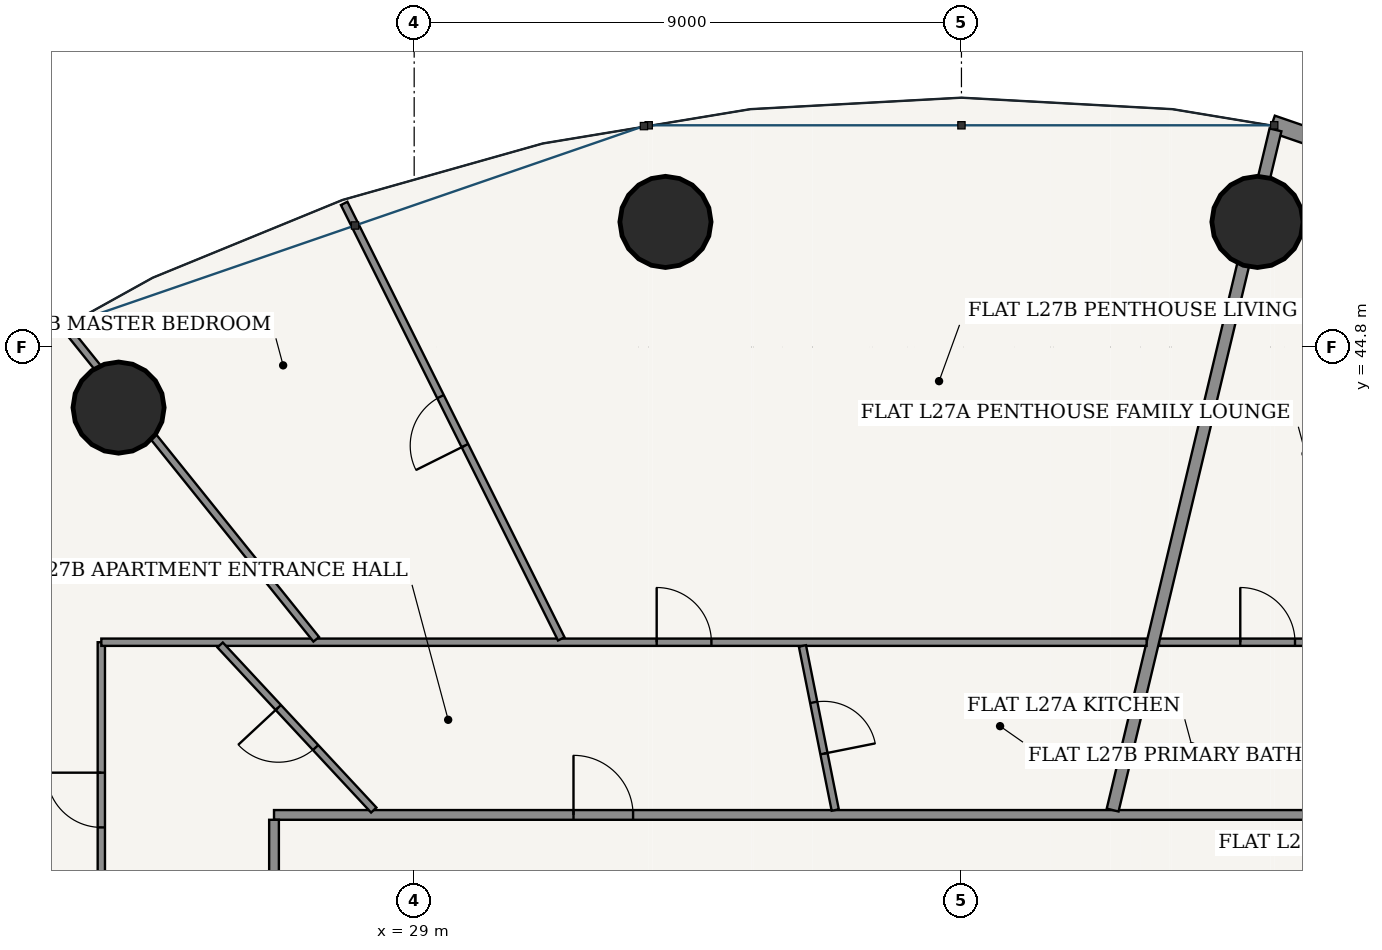
"""IFC4 building model, lengths in metres.
Left out: names, types, materials, properties, quantities, classifications, styles, units other than length and angle.
Written with IfcOpenShell. Run it as: python <this file> out.ifc"""

import sys

from ifc_helpers import new_model, si_unit, direction, frame, frame_2d, origin, origin_2d, place, context, subcontext, project, spatial, rectangle, hollow_circle, extrude, source, transform, mapped, element, fill, save


model = new_model("IFC4")
c1 = context("Model", 3, precision=1e-05, world=origin(), true_north=direction((-0.2419218956, 0.970295726276)))
c2 = subcontext(c1, "Body", "Model", "MODEL_VIEW")
j1 = project(units=[si_unit("LENGTHUNIT", "METRE"), si_unit("PLANEANGLEUNIT", "RADIAN")], contexts=[c1])
p1 = place(None, origin())
s1 = spatial("IfcSite", under=j1, at=p1, CompositionType="ELEMENT")
p2 = place(p1, origin())
s2 = spatial("IfcBuilding", under=s1, at=p2, CompositionType="ELEMENT")
p3 = place(p2, frame((0.0, 0.0, 105.0)))
s3 = spatial("IfcBuildingStorey", under=s2, at=p3, CompositionType="ELEMENT", Elevation=105.0)
for number, where, z_axis, x_axis in (
    (1, (42.867, 46.857, 0.0), (0.0, 0.0, 1.0), (1.0, 0.0, 0.0)),
    (2, (33.133, 46.857, 0.0), (0.0, 0.0, 1.0), (1.0, 0.0, 0.0)),
    (3, (24.138, 43.803, 0.0), (0.0, 0.0, 1.0), (1.0, 0.0, 0.0)),
):
    element("IfcColumn", number, at=place(p3, frame(where, z_axis=z_axis, x_axis=x_axis)), inside=s3, PredefinedType="COLUMN", context=c2, shape_type="SweptSolid", body=[
        extrude(hollow_circle(Radius=0.75, WallThickness=0.045, at=origin_2d()), origin(), (0.0, 0.0, 1.0), 3.6),
    ])
p4 = place(p3, frame((52.837, 45.125, 0.0), z_axis=(0.0, 0.0, 1.0), x_axis=(-0.945597432299, 0.325339047809, 0.0)))
e4 = element("IfcWall", 4, at=p4, inside=s3, PredefinedType="SOLIDWALL", context=c2, shape_type="SweptSolid", body=[
    extrude(rectangle(XDim=10.289, YDim=0.28, at=frame_2d((5.145, 0.0))), origin(), (0.0, 0.0, 1.0), 3.325),
])
p5 = place(p4, frame((1.728, 0.0, 0.85)))
e5 = element("IfcOpeningElement", 5, at=p5, cuts=e4, PredefinedType="OPENING", context=c2, shape_type="SweptSolid", body=[
    extrude(rectangle(XDim=2.1, YDim=1.95, at=frame_2d((1.05, 0.975))), frame((0.0, 0.15, 0.0), z_axis=(0.0, -1.0, 0.0), x_axis=(1.0, 0.0, 0.0)), (0.0, 0.0, 1.0), 0.3),
])
p6 = place(p4, frame((6.461, 0.0, 0.85)))
e6 = element("IfcOpeningElement", 6, at=p6, cuts=e4, PredefinedType="OPENING", context=c2, shape_type="SweptSolid", body=[
    extrude(rectangle(XDim=2.1, YDim=1.95, at=frame_2d((1.05, 0.975))), frame((0.0, 0.15, 0.0), z_axis=(0.0, -1.0, 0.0), x_axis=(1.0, 0.0, 0.0)), (0.0, 0.0, 1.0), 0.3),
])
p7 = place(p3, frame((26.695, 37.105, 0.0), z_axis=(0.0, 0.0, 1.0), x_axis=(1.0, 0.0, 0.0)))
e7 = element("IfcWall", 7, at=p7, inside=s3, PredefinedType="PARTITIONING", context=c2, shape_type="SweptSolid", body=[
    extrude(rectangle(XDim=22.61, YDim=0.16, at=frame_2d((11.305, 0.0))), origin(), (0.0, 0.0, 1.0), 2.767),
])
p8 = place(p7, frame((4.925, 0.0, 0.0)))
e8 = element("IfcOpeningElement", 8, at=p8, cuts=e7, PredefinedType="OPENING", context=c2, shape_type="SweptSolid", body=[
    extrude(rectangle(XDim=0.98, YDim=2.2, at=frame_2d((0.49, 1.1))), frame((0.0, 0.09, 0.0), z_axis=(0.0, -1.0, 0.0), x_axis=(1.0, 0.0, 0.0)), (0.0, 0.0, 1.0), 0.18),
])
p9 = place(p3, frame((26.695, 16.575, 0.0), z_axis=(0.0, 0.0, 1.0), x_axis=(0.0, 1.0, 0.0)))
e9 = element("IfcWall", 9, at=p9, inside=s3, PredefinedType="PARTITIONING", context=c2, shape_type="SweptSolid", body=[
    extrude(rectangle(XDim=20.45, YDim=0.16, at=frame_2d((10.225, 0.0))), origin(), (0.0, 0.0, 1.0), 2.767),
])
p10 = place(p9, frame((9.547, 0.0, 0.0)))
e10 = element("IfcOpeningElement", 10, at=p10, cuts=e9, PredefinedType="OPENING", context=c2, shape_type="SweptSolid", body=[
    extrude(rectangle(XDim=0.98, YDim=2.2, at=frame_2d((0.49, 1.1))), frame((0.0, 0.09, 0.0), z_axis=(0.0, -1.0, 0.0), x_axis=(1.0, 0.0, 0.0)), (0.0, 0.0, 1.0), 0.18),
])
p11 = place(p3, frame((41.249, 39.945, 0.0), z_axis=(0.0, 0.0, 1.0), x_axis=(1.0, 0.0, 0.0)))
e11 = element("IfcWall", 11, at=p11, inside=s3, PredefinedType="PARTITIONING", context=c2, shape_type="SweptSolid", body=[
    extrude(rectangle(XDim=10.896, YDim=0.12, at=frame_2d((5.448, 0.0))), origin(), (0.0, 0.0, 1.0), 2.767),
])
p12 = place(p11, frame((1.336, 0.0, 0.0)))
e12 = element("IfcOpeningElement", 12, at=p12, cuts=e11, PredefinedType="OPENING", context=c2, shape_type="SweptSolid", body=[
    extrude(rectangle(XDim=0.9, YDim=2.15, at=frame_2d((0.45, 1.075))), frame((0.0, 0.07, 0.0), z_axis=(0.0, -1.0, 0.0), x_axis=(1.0, 0.0, 0.0)), (0.0, 0.0, 1.0), 0.14),
])
p13 = place(p3, frame((40.486, 37.185, 0.0), z_axis=(0.0, 0.0, 1.0), x_axis=(0.232834224261, 0.972516438942, 0.0)))
e13 = element("IfcWall", 13, at=p13, inside=s3, PredefinedType="PARTITIONING", context=c2, shape_type="SweptSolid", body=[
    extrude(rectangle(XDim=11.502, YDim=0.2, at=frame_2d((5.751, 0.0))), origin(), (0.0, 0.0, 1.0), 2.767),
])
p14 = place(p3, frame((23.855, 34.754, 0.0), z_axis=(0.0, 0.0, 1.0), x_axis=(0.0, 1.0, 0.0)))
e14 = element("IfcWall", 14, at=p14, inside=s3, PredefinedType="PARTITIONING", context=c2, shape_type="SweptSolid", body=[
    extrude(rectangle(XDim=5.191, YDim=0.12, at=frame_2d((2.595, 0.0))), origin(), (0.0, 0.0, 1.0), 3.004),
])
p15 = place(p14, frame((2.145, 0.0, 0.0)))
e15 = element("IfcOpeningElement", 15, at=p15, cuts=e14, PredefinedType="OPENING", context=c2, shape_type="SweptSolid", body=[
    extrude(rectangle(XDim=0.9, YDim=2.15, at=frame_2d((0.45, 1.075))), frame((0.0, 0.07, 0.0), z_axis=(0.0, -1.0, 0.0), x_axis=(1.0, 0.0, 0.0)), (0.0, 0.0, 1.0), 0.14),
])
p16 = place(p3, frame((23.855, 39.945, 0.0), z_axis=(0.0, 0.0, 1.0), x_axis=(1.0, 0.0, 0.0)))
e16 = element("IfcWall", 16, at=p16, inside=s3, PredefinedType="PARTITIONING", context=c2, shape_type="SweptSolid", body=[
    extrude(rectangle(XDim=17.19, YDim=0.12, at=frame_2d((8.595, 0.0))), origin(), (0.0, 0.0, 1.0), 2.767),
])
p17 = place(p16, frame((9.133, 0.0, 0.0)))
e17 = element("IfcOpeningElement", 17, at=p17, cuts=e16, PredefinedType="OPENING", context=c2, shape_type="SweptSolid", body=[
    extrude(rectangle(XDim=0.9, YDim=2.15, at=frame_2d((0.45, 1.075))), frame((0.0, 0.07, 0.0), z_axis=(0.0, -1.0, 0.0), x_axis=(1.0, 0.0, 0.0)), (0.0, 0.0, 1.0), 0.14),
])
p18 = place(p3, frame((31.419, 40.0, 0.0), z_axis=(0.0, 0.0, 1.0), x_axis=(-0.446188142997, 0.894939182877, 0.0)))
e18 = element("IfcWall", 18, at=p18, inside=s3, PredefinedType="PARTITIONING", context=c2, shape_type="SweptSolid", body=[
    extrude(rectangle(XDim=8.002, YDim=0.12, at=frame_2d((4.001, 0.0))), origin(), (0.0, 0.0, 1.0), 2.767),
])
p19 = place(p18, frame((3.551, 0.0, 0.0)))
e19 = element("IfcOpeningElement", 19, at=p19, cuts=e18, PredefinedType="OPENING", context=c2, shape_type="SweptSolid", body=[
    extrude(rectangle(XDim=0.9, YDim=2.15, at=frame_2d((0.45, 1.075))), frame((0.0, 0.07, 0.0), z_axis=(0.0, -1.0, 0.0), x_axis=(1.0, 0.0, 0.0)), (0.0, 0.0, 1.0), 0.14),
])
p20 = place(p3, frame((27.389, 39.993, 0.0), z_axis=(0.0, 0.0, 1.0), x_axis=(-0.626719700294, 0.779244773651, 0.0)))
e20 = element("IfcWall", 20, at=p20, inside=s3, PredefinedType="PARTITIONING", context=c2, shape_type="SweptSolid", body=[
    extrude(rectangle(XDim=6.537, YDim=0.12, at=frame_2d((3.269, 0.0))), origin(), (0.0, 0.0, 1.0), 2.767),
])
p21 = place(p3, frame((35.925, 37.185, 0.0), z_axis=(0.0, 0.0, 1.0), x_axis=(-0.196013794811, 0.980601138202, 0.0)))
e21 = element("IfcWall", 21, at=p21, inside=s3, PredefinedType="PARTITIONING", context=c2, shape_type="SweptSolid", body=[
    extrude(rectangle(XDim=2.753, YDim=0.12, at=frame_2d((1.376, 0.0))), origin(), (0.0, 0.0, 1.0), 3.325),
])
p22 = place(p21, frame((0.946, 0.0, 0.0)))
e22 = element("IfcOpeningElement", 22, at=p22, cuts=e21, PredefinedType="OPENING", context=c2, shape_type="SweptSolid", body=[
    extrude(rectangle(XDim=0.86, YDim=2.15, at=frame_2d((0.43, 1.075))), frame((0.0, 0.07, 0.0), z_axis=(0.0, -1.0, 0.0), x_axis=(1.0, 0.0, 0.0)), (0.0, 0.0, 1.0), 0.14),
])
p23 = place(p3, frame((28.335, 37.185, 0.0), z_axis=(0.0, 0.0, 1.0), x_axis=(-0.681236086606, 0.732063791145, 0.0)))
e23 = element("IfcWall", 23, at=p23, inside=s3, PredefinedType="PARTITIONING", context=c2, shape_type="SweptSolid", body=[
    extrude(rectangle(XDim=3.708, YDim=0.12, at=frame_2d((1.854, 0.0))), origin(), (0.0, 0.0, 1.0), 2.767),
])
p24 = place(p23, frame((1.404, 0.0, 0.0)))
e24 = element("IfcOpeningElement", 24, at=p24, cuts=e23, PredefinedType="OPENING", context=c2, shape_type="SweptSolid", body=[
    extrude(rectangle(XDim=0.9, YDim=2.15, at=frame_2d((0.45, 1.075))), frame((0.0, 0.07, 0.0), z_axis=(0.0, -1.0, 0.0), x_axis=(1.0, 0.0, 0.0)), (0.0, 0.0, 1.0), 0.14),
])
p25 = place(p3, frame((26.615, 33.12, 0.0), z_axis=(0.0, 0.0, 1.0), x_axis=(-0.874319192772, 0.485351366692, 0.0)))
e25 = element("IfcWall", 25, at=p25, inside=s3, PredefinedType="PARTITIONING", context=c2, shape_type="SweptSolid", body=[
    extrude(rectangle(XDim=12.158, YDim=0.2, at=frame_2d((6.079, 0.0))), origin(), (0.0, 0.0, 1.0), 2.767),
])
m1 = source(origin(), c2, "Body", "SweptSolid", [
    extrude(rectangle(XDim=0.9, YDim=2.15, at=frame_2d((0.45, 1.075))), frame((0.0, 0.025, 0.0), z_axis=(0.0, -1.0, 0.0), x_axis=(1.0, 0.0, 0.0)), (0.0, 0.0, 1.0), 0.05),
])
p26 = place(p12, origin())
e26 = element("IfcDoor", 26, at=p26, inside=s3, OperationType="SINGLE_SWING_LEFT", PredefinedType="DOOR", context=c2, shape_type="MappedRepresentation", body=[
    mapped(m1, transform((0.0, 0.0, 0.0), scale=1.0)),
])
fill(e12, e26)
m2 = source(origin(), c2, "Body", "SweptSolid", [
    extrude(rectangle(XDim=0.98, YDim=2.2, at=frame_2d((0.49, 1.1))), frame((0.0, 0.025, 0.0), z_axis=(0.0, -1.0, 0.0), x_axis=(1.0, 0.0, 0.0)), (0.0, 0.0, 1.0), 0.05),
])
p27 = place(p8, origin())
e27 = element("IfcDoor", 27, at=p27, inside=s3, OperationType="SINGLE_SWING_LEFT", PredefinedType="DOOR", context=c2, shape_type="MappedRepresentation", body=[
    mapped(m2, transform((0.0, 0.0, 0.0), scale=1.0)),
])
fill(e8, e27)
m3 = source(origin(), c2, "Body", "SweptSolid", [
    extrude(rectangle(XDim=0.86, YDim=2.15, at=frame_2d((0.43, 1.075))), frame((0.0, 0.025, 0.0), z_axis=(0.0, -1.0, 0.0), x_axis=(1.0, 0.0, 0.0)), (0.0, 0.0, 1.0), 0.05),
])
p28 = place(p22, frame((0.86, 0.0, 0.0), z_axis=(0.0, 0.0, 1.0), x_axis=(-1.0, 0.0, 0.0)))
e28 = element("IfcDoor", 28, at=p28, inside=s3, OperationType="SINGLE_SWING_RIGHT", PredefinedType="DOOR", context=c2, shape_type="MappedRepresentation", body=[
    mapped(m3, transform((0.0, 0.0, 0.0), scale=1.0)),
])
fill(e22, e28)
p29 = place(p17, origin())
e29 = element("IfcDoor", 29, at=p29, inside=s3, OperationType="SINGLE_SWING_LEFT", PredefinedType="DOOR", context=c2, shape_type="MappedRepresentation", body=[
    mapped(m1, transform((0.0, 0.0, 0.0), scale=1.0)),
])
fill(e17, e29)
p30 = place(p24, origin())
e30 = element("IfcDoor", 30, at=p30, inside=s3, OperationType="SINGLE_SWING_RIGHT", PredefinedType="DOOR", context=c2, shape_type="MappedRepresentation", body=[
    mapped(m1, transform((0.0, 0.0, 0.0), scale=1.0)),
])
fill(e24, e30)
p31 = place(p19, origin())
e31 = element("IfcDoor", 31, at=p31, inside=s3, OperationType="SINGLE_SWING_LEFT", PredefinedType="DOOR", context=c2, shape_type="MappedRepresentation", body=[
    mapped(m1, transform((0.0, 0.0, 0.0), scale=1.0)),
])
fill(e19, e31)
p32 = place(p15, origin())
e32 = element("IfcDoor", 32, at=p32, inside=s3, OperationType="SINGLE_SWING_RIGHT", PredefinedType="DOOR", context=c2, shape_type="MappedRepresentation", body=[
    mapped(m1, transform((0.0, 0.0, 0.0), scale=1.0)),
])
fill(e15, e32)
save(model, sys.argv[1])
